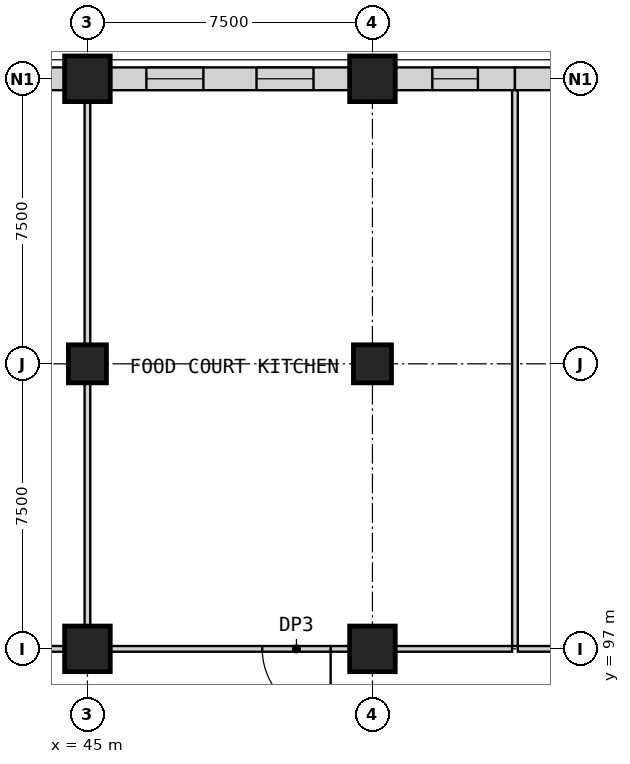
"""IFC4 building model, lengths in metres.
Left out: names, types, materials, properties, quantities, classifications, styles, units other than length and angle.
Written with IfcOpenShell. Run it as: python <this file> out.ifc"""

import sys

from ifc_helpers import new_model, si_unit, direction, frame, frame_2d, origin, origin_2d, place, context, subcontext, project, spatial, rectangle, extrude, element, fill, save


model = new_model("IFC4")
c1 = context("Model", 3, precision=1e-05, world=origin(), true_north=direction((0.0, 1.0)))
c2 = subcontext(c1, "Body", "Model", "MODEL_VIEW")
j1 = project(units=[si_unit("LENGTHUNIT", "METRE"), si_unit("PLANEANGLEUNIT", "RADIAN")], contexts=[c1])
p1 = place(None, origin())
s1 = spatial("IfcSite", under=j1, at=p1, CompositionType="ELEMENT")
p2 = place(p1, origin())
s2 = spatial("IfcBuilding", under=s1, at=p2, CompositionType="ELEMENT")
p3 = place(p2, frame((0.0, 0.0, 18.5)))
s3 = spatial("IfcBuildingStorey", under=s2, at=p3, CompositionType="ELEMENT", Elevation=18.5)
p4 = place(p3, frame((45.0, 97.0, 0.0), z_axis=(0.0, 0.0, 1.0), x_axis=(1.0, 0.0, 0.0)))
e1 = element("IfcColumn", 1, at=p4, inside=s3, PredefinedType="COLUMN", context=c2, shape_type="SweptSolid", body=[
    extrude(rectangle(XDim=1.2, YDim=1.2, at=origin_2d()), origin(), (0.0, 0.0, 1.0), 5.0),
])
p5 = place(p3, frame((45.0, 104.5, 0.0), z_axis=(0.0, 0.0, 1.0), x_axis=(1.0, 0.0, 0.0)))
e2 = element("IfcColumn", 2, at=p5, inside=s3, PredefinedType="COLUMN", context=c2, shape_type="SweptSolid", body=[
    extrude(rectangle(XDim=1.0, YDim=1.0, at=origin_2d()), origin(), (0.0, 0.0, 1.0), 5.0),
])
p6 = place(p3, frame((52.5, 97.0, 0.0), z_axis=(0.0, 0.0, 1.0), x_axis=(1.0, 0.0, 0.0)))
e3 = element("IfcColumn", 3, at=p6, inside=s3, PredefinedType="COLUMN", context=c2, shape_type="SweptSolid", body=[
    extrude(rectangle(XDim=1.2, YDim=1.2, at=origin_2d()), origin(), (0.0, 0.0, 1.0), 5.0),
])
p7 = place(p3, frame((52.5, 104.5, 0.0), z_axis=(0.0, 0.0, 1.0), x_axis=(1.0, 0.0, 0.0)))
e4 = element("IfcColumn", 4, at=p7, inside=s3, PredefinedType="COLUMN", context=c2, shape_type="SweptSolid", body=[
    extrude(rectangle(XDim=1.0, YDim=1.0, at=origin_2d()), origin(), (0.0, 0.0, 1.0), 5.0),
])
for number, where, z_axis, x_axis in (
    (5, (45.0, 112.0, 0.0), (0.0, 0.0, 1.0), (1.0, 0.0, 0.0)),
    (6, (52.5, 112.0, 0.0), (0.0, 0.0, 1.0), (1.0, 0.0, 0.0)),
):
    element("IfcColumn", number, at=place(p3, frame(where, z_axis=z_axis, x_axis=x_axis)), inside=s3, PredefinedType="COLUMN", context=c2, shape_type="SweptSolid", body=[
        extrude(rectangle(XDim=1.2, YDim=1.2, at=origin_2d()), origin(), (0.0, 0.0, 1.0), 5.0),
    ])
p8 = place(p3, frame((44.4, 97.0, 0.0), z_axis=(0.0, 0.0, 1.0), x_axis=(-1.0, 0.0, 0.0)))
e7 = element("IfcWall", 7, at=p8, inside=s3, PredefinedType="PARTITIONING", context=c2, shape_type="SweptSolid", body=[
    extrude(rectangle(XDim=6.3, YDim=0.15, at=frame_2d((3.15, 0.0))), origin(), (0.0, 0.0, 1.0), 4.7),
])
p9 = place(p8, frame((4.0, 0.0, 0.0)))
e8 = element("IfcOpeningElement", 8, at=p9, cuts=e7, PredefinedType="OPENING", context=c2, shape_type="SweptSolid", body=[
    extrude(rectangle(XDim=1.8, YDim=2.4, at=frame_2d((0.9, 1.2))), frame((0.0, 0.085, 0.0), z_axis=(0.0, -1.0, 0.0), x_axis=(1.0, 0.0, 0.0)), (0.0, 0.0, 1.0), 0.17),
])
p10 = place(p3, frame((51.9, 97.0, 0.0), z_axis=(0.0, 0.0, 1.0), x_axis=(-1.0, 0.0, 0.0)))
e9 = element("IfcWall", 9, at=p10, inside=s3, PredefinedType="PARTITIONING", context=c2, shape_type="SweptSolid", body=[
    extrude(rectangle(XDim=6.3, YDim=0.15, at=frame_2d((3.15, 0.0))), origin(), (0.0, 0.0, 1.0), 4.7),
])
p11 = place(p10, frame((0.5, 0.0, 0.0)))
e10 = element("IfcOpeningElement", 10, at=p11, cuts=e9, PredefinedType="OPENING", context=c2, shape_type="SweptSolid", body=[
    extrude(rectangle(XDim=1.8, YDim=2.4, at=frame_2d((0.9, 1.2))), frame((0.0, 0.085, 0.0), z_axis=(0.0, -1.0, 0.0), x_axis=(1.0, 0.0, 0.0)), (0.0, 0.0, 1.0), 0.17),
])
for number, where, z_axis, x_axis in (
    (11, (53.1, 97.0, 0.0), (0.0, 0.0, 1.0), (1.0, 0.0, 0.0)),
    (12, (56.325, 97.0, 0.0), (0.0, 0.0, 1.0), (1.0, 0.0, 0.0)),
):
    element("IfcWall", number, at=place(p3, frame(where, z_axis=z_axis, x_axis=x_axis)), inside=s3, PredefinedType="PARTITIONING", context=c2, shape_type="SweptSolid", body=[
        extrude(rectangle(XDim=3.075, YDim=0.15, at=frame_2d((1.538, 0.0))), origin(), (0.0, 0.0, 1.0), 4.7),
    ])
p12 = place(p3, frame((38.1, 112.0, 0.0), z_axis=(0.0, 0.0, 1.0), x_axis=(1.0, 0.0, 0.0)))
e13 = element("IfcWall", 13, at=p12, inside=s3, PredefinedType="PARTITIONING", context=c2, shape_type="SweptSolid", body=[
    extrude(rectangle(XDim=6.3, YDim=0.6, at=frame_2d((3.15, 0.0))), origin(), (0.0, 0.0, 1.0), 4.1),
])
p13 = place(p12, frame((0.951, 0.0, 0.9)))
e14 = element("IfcOpeningElement", 14, at=p13, cuts=e13, PredefinedType="OPENING", context=c2, shape_type="SweptSolid", body=[
    extrude(rectangle(XDim=1.5, YDim=2.8, at=frame_2d((0.75, 1.4))), frame((0.0, 0.31, 0.0), z_axis=(0.0, -1.0, 0.0), x_axis=(1.0, 0.0, 0.0)), (0.0, 0.0, 1.0), 0.62),
])
p14 = place(p12, frame((3.849, 0.0, 0.9)))
e15 = element("IfcOpeningElement", 15, at=p14, cuts=e13, PredefinedType="OPENING", context=c2, shape_type="SweptSolid", body=[
    extrude(rectangle(XDim=1.5, YDim=2.8, at=frame_2d((0.75, 1.4))), frame((0.0, 0.31, 0.0), z_axis=(0.0, -1.0, 0.0), x_axis=(1.0, 0.0, 0.0)), (0.0, 0.0, 1.0), 0.62),
])
p15 = place(p3, frame((45.6, 112.0, 0.0), z_axis=(0.0, 0.0, 1.0), x_axis=(1.0, 0.0, 0.0)))
e16 = element("IfcWall", 16, at=p15, inside=s3, PredefinedType="PARTITIONING", context=c2, shape_type="SweptSolid", body=[
    extrude(rectangle(XDim=6.3, YDim=0.6, at=frame_2d((3.15, 0.0))), origin(), (0.0, 0.0, 1.0), 4.1),
])
p16 = place(p15, frame((0.951, 0.0, 0.9)))
e17 = element("IfcOpeningElement", 17, at=p16, cuts=e16, PredefinedType="OPENING", context=c2, shape_type="SweptSolid", body=[
    extrude(rectangle(XDim=1.5, YDim=2.8, at=frame_2d((0.75, 1.4))), frame((0.0, 0.31, 0.0), z_axis=(0.0, -1.0, 0.0), x_axis=(1.0, 0.0, 0.0)), (0.0, 0.0, 1.0), 0.62),
])
p17 = place(p15, frame((3.849, 0.0, 0.9)))
e18 = element("IfcOpeningElement", 18, at=p17, cuts=e16, PredefinedType="OPENING", context=c2, shape_type="SweptSolid", body=[
    extrude(rectangle(XDim=1.5, YDim=2.8, at=frame_2d((0.75, 1.4))), frame((0.0, 0.31, 0.0), z_axis=(0.0, -1.0, 0.0), x_axis=(1.0, 0.0, 0.0)), (0.0, 0.0, 1.0), 0.62),
])
p18 = place(p3, frame((53.1, 112.0, 0.0), z_axis=(0.0, 0.0, 1.0), x_axis=(1.0, 0.0, 0.0)))
e19 = element("IfcWall", 19, at=p18, inside=s3, PredefinedType="PARTITIONING", context=c2, shape_type="SweptSolid", body=[
    extrude(rectangle(XDim=3.15, YDim=0.6, at=frame_2d((1.575, 0.0))), origin(), (0.0, 0.0, 1.0), 4.1),
])
p19 = place(p18, frame((0.975, 0.0, 0.9)))
e20 = element("IfcOpeningElement", 20, at=p19, cuts=e19, PredefinedType="OPENING", context=c2, shape_type="SweptSolid", body=[
    extrude(rectangle(XDim=1.2, YDim=2.8, at=frame_2d((0.6, 1.4))), frame((0.0, 0.31, 0.0), z_axis=(0.0, -1.0, 0.0), x_axis=(1.0, 0.0, 0.0)), (0.0, 0.0, 1.0), 0.62),
])
p20 = place(p3, frame((56.25, 112.0, 0.0), z_axis=(0.0, 0.0, 1.0), x_axis=(1.0, 0.0, 0.0)))
e21 = element("IfcWall", 21, at=p20, inside=s3, PredefinedType="PARTITIONING", context=c2, shape_type="SweptSolid", body=[
    extrude(rectangle(XDim=3.15, YDim=0.6, at=frame_2d((1.575, 0.0))), origin(), (0.0, 0.0, 1.0), 4.1),
])
p21 = place(p20, frame((0.975, 0.0, 0.9)))
e22 = element("IfcOpeningElement", 22, at=p21, cuts=e21, PredefinedType="OPENING", context=c2, shape_type="SweptSolid", body=[
    extrude(rectangle(XDim=1.2, YDim=2.8, at=frame_2d((0.6, 1.4))), frame((0.0, 0.31, 0.0), z_axis=(0.0, -1.0, 0.0), x_axis=(1.0, 0.0, 0.0)), (0.0, 0.0, 1.0), 0.62),
])
for number, where, z_axis, x_axis in (
    (23, (45.0, 97.6, 0.0), (0.0, 0.0, 1.0), (0.0, 1.0, 0.0)),
    (24, (45.0, 105.0, 0.0), (0.0, 0.0, 1.0), (0.0, 1.0, 0.0)),
):
    element("IfcWall", number, at=place(p3, frame(where, z_axis=z_axis, x_axis=x_axis)), inside=s3, PredefinedType="PARTITIONING", context=c2, shape_type="SweptSolid", body=[
        extrude(rectangle(XDim=6.4, YDim=0.15, at=frame_2d((3.2, 0.0))), origin(), (0.0, 0.0, 1.0), 4.7),
    ])
p22 = place(p3, frame((56.25, 97.075, 0.0), z_axis=(0.0, 0.0, 1.0), x_axis=(0.0, 1.0, 0.0)))
e25 = element("IfcWall", 25, at=p22, inside=s3, PredefinedType="PARTITIONING", context=c2, shape_type="SweptSolid", body=[
    extrude(rectangle(XDim=14.625, YDim=0.15, at=frame_2d((7.312, 0.0))), origin(), (0.0, 0.0, 1.0), 4.7),
])
p23 = place(p11, origin())
e26 = element("IfcDoor", 26, at=p23, inside=s3, OperationType="SINGLE_SWING_LEFT", PredefinedType="DOOR", context=c2, shape_type="SweptSolid", body=[
    extrude(rectangle(XDim=1.8, YDim=2.4, at=frame_2d((0.9, 1.2))), frame((0.0, 0.025, 0.0), z_axis=(0.0, -1.0, 0.0), x_axis=(1.0, 0.0, 0.0)), (0.0, 0.0, 1.0), 0.05),
])
fill(e10, e26)
p24 = place(p16, origin())
e27 = element("IfcWindow", 27, at=p24, inside=s3, PartitioningType="SINGLE_PANEL", PredefinedType="WINDOW", context=c2, shape_type="SweptSolid", body=[
    extrude(rectangle(XDim=1.5, YDim=2.8, at=frame_2d((0.75, 1.4))), frame((0.0, 0.03, 0.0), z_axis=(0.0, -1.0, 0.0), x_axis=(1.0, 0.0, 0.0)), (0.0, 0.0, 1.0), 0.06),
])
fill(e17, e27)
p25 = place(p17, origin())
e28 = element("IfcWindow", 28, at=p25, inside=s3, PartitioningType="SINGLE_PANEL", PredefinedType="WINDOW", context=c2, shape_type="SweptSolid", body=[
    extrude(rectangle(XDim=1.5, YDim=2.8, at=frame_2d((0.75, 1.4))), frame((0.0, 0.03, 0.0), z_axis=(0.0, -1.0, 0.0), x_axis=(1.0, 0.0, 0.0)), (0.0, 0.0, 1.0), 0.06),
])
fill(e18, e28)
p26 = place(p19, origin())
e29 = element("IfcWindow", 29, at=p26, inside=s3, PartitioningType="SINGLE_PANEL", PredefinedType="WINDOW", context=c2, shape_type="SweptSolid", body=[
    extrude(rectangle(XDim=1.2, YDim=2.8, at=frame_2d((0.6, 1.4))), frame((0.0, 0.03, 0.0), z_axis=(0.0, -1.0, 0.0), x_axis=(1.0, 0.0, 0.0)), (0.0, 0.0, 1.0), 0.06),
])
fill(e20, e29)
save(model, sys.argv[1])
